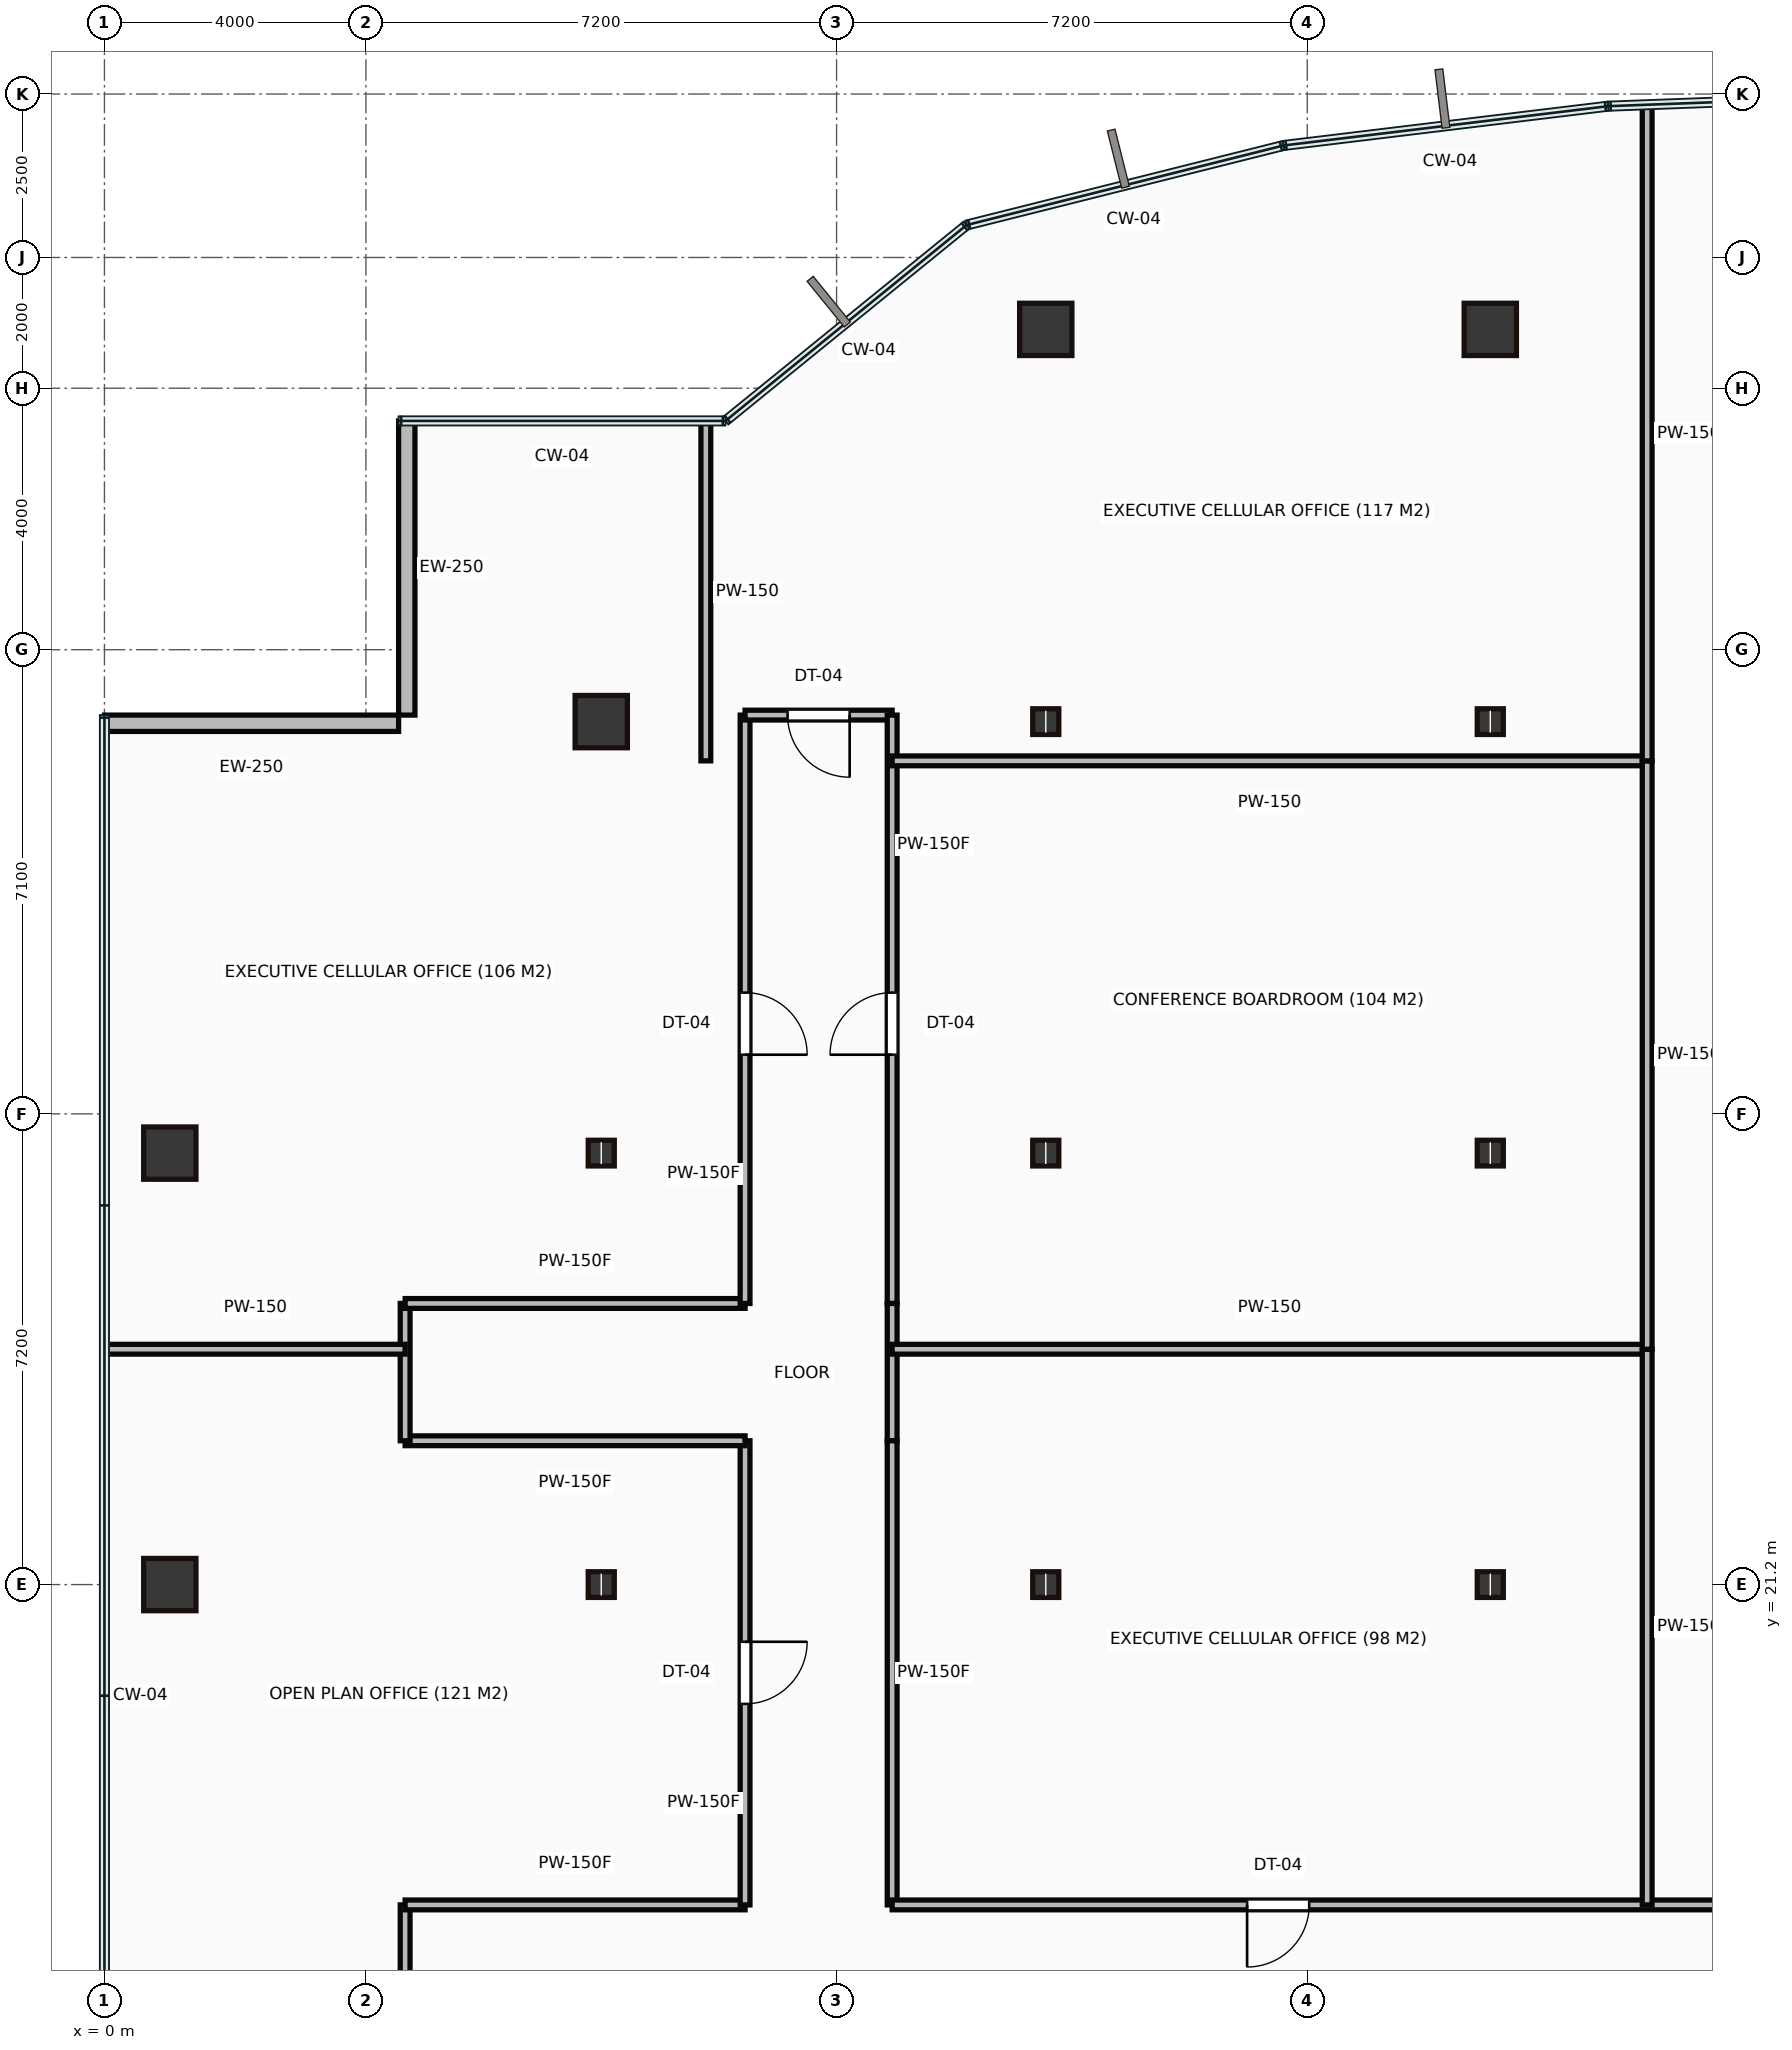
"""IFC4 building model, lengths in metres.
Left out: names, types, materials, properties, quantities, classifications, styles, units other than length and angle.
Written with IfcOpenShell. Run it as: python <this file> out.ifc"""

import sys

from ifc_helpers import new_model, si_unit, direction, frame, frame_2d, origin, origin_2d, place, context, subcontext, project, spatial, rectangle, hollow_rectangle, i_section, extrude, source, transform, mapped, element, fill, save


model = new_model("IFC4")
c1 = context("Model", 3, precision=1e-05, world=origin(), true_north=direction((0.0, 1.0)))
c2 = subcontext(c1, "Body", "Model", "MODEL_VIEW")
j1 = project(units=[si_unit("LENGTHUNIT", "METRE"), si_unit("PLANEANGLEUNIT", "RADIAN")], contexts=[c1])
p1 = place(None, origin())
s1 = spatial("IfcSite", under=j1, at=p1, CompositionType="ELEMENT")
p2 = place(p1, origin())
s2 = spatial("IfcBuilding", under=s1, at=p2, CompositionType="ELEMENT")
p3 = place(p2, frame((0.0, 0.0, 88.65)))
s3 = spatial("IfcBuildingStorey", under=s2, at=p3, CompositionType="ELEMENT", Elevation=88.65)
m1 = source(origin(), c2, "Body", "SweptSolid", [
    extrude(hollow_rectangle(XDim=0.8, YDim=0.8, WallThickness=0.04, at=origin_2d()), origin(), (0.0, 0.0, 1.0), 3.65),
])
for number, where, z_axis, x_axis in (
    (1, (1.0, 21.2, 0.0), (0.0, 0.0, 1.0), (1.0, 0.0, 0.0)),
    (2, (1.0, 27.8, 0.0), (0.0, 0.0, 1.0), (1.0, 0.0, 0.0)),
):
    element("IfcColumn", number, at=place(p3, frame(where, z_axis=z_axis, x_axis=x_axis)), inside=s3, PredefinedType="COLUMN", context=c2, shape_type="MappedRepresentation", body=[
        mapped(m1, transform((0.0, 0.0, 0.0))),
    ])
m2 = source(origin(), c2, "Body", "SweptSolid", [
    extrude(i_section(OverallWidth=0.399, OverallDepth=0.393, WebThickness=0.023, FlangeThickness=0.037, at=origin_2d()), origin(), (0.0, 0.0, 1.0), 3.65),
])
for number, where, z_axis, x_axis in (
    (3, (7.6, 21.2, 0.0), (0.0, 0.0, 1.0), (1.0, 0.0, 0.0)),
    (4, (7.6, 27.8, 0.0), (0.0, 0.0, 1.0), (1.0, 0.0, 0.0)),
):
    element("IfcColumn", number, at=place(p3, frame(where, z_axis=z_axis, x_axis=x_axis)), inside=s3, PredefinedType="COLUMN", context=c2, shape_type="MappedRepresentation", body=[
        mapped(m2, transform((0.0, 0.0, 0.0))),
    ])
p4 = place(p3, frame((7.6, 34.4, 0.0), z_axis=(0.0, 0.0, 1.0), x_axis=(1.0, 0.0, 0.0)))
e5 = element("IfcColumn", 5, at=p4, inside=s3, PredefinedType="COLUMN", context=c2, shape_type="MappedRepresentation", body=[
    mapped(m1, transform((0.0, 0.0, 0.0))),
])
for number, where, z_axis, x_axis in (
    (6, (14.4, 21.2, 0.0), (0.0, 0.0, 1.0), (1.0, 0.0, 0.0)),
    (7, (14.4, 27.8, 0.0), (0.0, 0.0, 1.0), (1.0, 0.0, 0.0)),
    (8, (14.4, 34.4, 0.0), (0.0, 0.0, 1.0), (1.0, 0.0, 0.0)),
):
    element("IfcColumn", number, at=place(p3, frame(where, z_axis=z_axis, x_axis=x_axis)), inside=s3, PredefinedType="COLUMN", context=c2, shape_type="MappedRepresentation", body=[
        mapped(m2, transform((0.0, 0.0, 0.0))),
    ])
p5 = place(p3, frame((14.4, 40.4, 0.0), z_axis=(0.0, 0.0, 1.0), x_axis=(1.0, 0.0, 0.0)))
e9 = element("IfcColumn", 9, at=p5, inside=s3, PredefinedType="COLUMN", context=c2, shape_type="MappedRepresentation", body=[
    mapped(m1, transform((0.0, 0.0, 0.0))),
])
for number, where, z_axis, x_axis in (
    (10, (21.2, 21.2, 0.0), (0.0, 0.0, 1.0), (1.0, 0.0, 0.0)),
    (11, (21.2, 27.8, 0.0), (0.0, 0.0, 1.0), (1.0, 0.0, 0.0)),
    (12, (21.2, 34.4, 0.0), (0.0, 0.0, 1.0), (1.0, 0.0, 0.0)),
):
    element("IfcColumn", number, at=place(p3, frame(where, z_axis=z_axis, x_axis=x_axis)), inside=s3, PredefinedType="COLUMN", context=c2, shape_type="MappedRepresentation", body=[
        mapped(m2, transform((0.0, 0.0, 0.0))),
    ])
p6 = place(p3, frame((21.2, 40.4, 0.0), z_axis=(0.0, 0.0, 1.0), x_axis=(1.0, 0.0, 0.0)))
e13 = element("IfcColumn", 13, at=p6, inside=s3, PredefinedType="COLUMN", context=c2, shape_type="MappedRepresentation", body=[
    mapped(m1, transform((0.0, 0.0, 0.0))),
])
m3 = source(origin(), c2, "Body", "SweptSolid", [
    extrude(rectangle(XDim=4.5, YDim=0.25, at=frame_2d((2.25, 0.0))), origin(), (0.0, 0.0, 1.0), 3.4),
])
for number, where, z_axis, x_axis in (
    (14, (4.625, 39.0, 0.0), (0.0, 0.0, 1.0), (0.0, -1.0, 0.0)),
    (15, (4.5, 34.375, 0.0), (0.0, 0.0, 1.0), (-1.0, 0.0, 0.0)),
):
    element("IfcWall", number, at=place(p3, frame(where, z_axis=z_axis, x_axis=x_axis)), inside=s3, PredefinedType="STANDARD", context=c2, shape_type="MappedRepresentation", body=[
        mapped(m3, transform((0.0, 0.0, 0.0))),
    ])
m4 = source(origin(), c2, "Body", "SweptSolid", [
    extrude(rectangle(XDim=2.22, YDim=0.15, at=frame_2d((1.11, 0.0))), origin(), (0.0, 0.0, 1.0), 3.4),
])
p7 = place(p3, frame((4.6, 14.08, 0.0), z_axis=(0.0, 0.0, 1.0), x_axis=(0.0, 1.0, 0.0)))
e16 = element("IfcWall", 16, at=p7, inside=s3, PredefinedType="PARTITIONING", context=c2, shape_type="MappedRepresentation", body=[
    mapped(m4, transform((0.0, 0.0, 0.0))),
])
m5 = source(origin(), c2, "Body", "SweptSolid", [
    extrude(rectangle(XDim=5.2, YDim=0.15, at=frame_2d((2.6, 0.0))), origin(), (0.0, 0.0, 1.0), 3.4),
])
p8 = place(p3, frame((4.6, 16.3, 0.0), z_axis=(0.0, 0.0, 1.0), x_axis=(1.0, 0.0, 0.0)))
e17 = element("IfcWall", 17, at=p8, inside=s3, PredefinedType="PARTITIONING", context=c2, shape_type="MappedRepresentation", body=[
    mapped(m5, transform((0.0, 0.0, 0.0))),
])
m6 = source(origin(), c2, "Body", "SweptSolid", [
    extrude(rectangle(XDim=7.1, YDim=0.15, at=frame_2d((3.55, 0.0))), origin(), (0.0, 0.0, 1.0), 3.4),
])
p9 = place(p3, frame((9.8, 16.3, 0.0), z_axis=(0.0, 0.0, 1.0), x_axis=(0.0, 1.0, 0.0)))
e18 = element("IfcWall", 18, at=p9, inside=s3, PredefinedType="PARTITIONING", context=c2, shape_type="MappedRepresentation", body=[
    mapped(m6, transform((0.0, 0.0, 0.0))),
])
p10 = place(p9, frame((3.075, 0.0, 0.0)))
e19 = element("IfcOpeningElement", 19, at=p10, cuts=e18, PredefinedType="OPENING", context=c2, shape_type="SweptSolid", body=[
    extrude(rectangle(XDim=0.95, YDim=2.15, at=frame_2d((0.475, 1.075))), frame((0.0, 0.085, 0.0), z_axis=(0.0, -1.0, 0.0), x_axis=(1.0, 0.0, 0.0)), (0.0, 0.0, 1.0), 0.17),
])
m7 = source(origin(), c2, "Body", "SweptSolid", [
    extrude(rectangle(XDim=5.2, YDim=0.15, at=frame_2d((2.6, 0.0))), origin(), (0.0, 0.0, 1.0), 2.988),
])
p11 = place(p3, frame((9.8, 23.4, 0.0), z_axis=(0.0, 0.0, 1.0), x_axis=(-1.0, 0.0, 0.0)))
e20 = element("IfcWall", 20, at=p11, inside=s3, PredefinedType="PARTITIONING", context=c2, shape_type="MappedRepresentation", body=[
    mapped(m7, transform((0.0, 0.0, 0.0))),
])
m8 = source(origin(), c2, "Body", "SweptSolid", [
    extrude(rectangle(XDim=2.1, YDim=0.15, at=frame_2d((1.05, 0.0))), origin(), (0.0, 0.0, 1.0), 3.4),
])
p12 = place(p3, frame((4.6, 23.4, 0.0), z_axis=(0.0, 0.0, 1.0), x_axis=(0.0, 1.0, 0.0)))
e21 = element("IfcWall", 21, at=p12, inside=s3, PredefinedType="PARTITIONING", context=c2, shape_type="MappedRepresentation", body=[
    mapped(m8, transform((0.0, 0.0, 0.0))),
])
p13 = place(p3, frame((4.6, 25.5, 0.0), z_axis=(0.0, 0.0, 1.0), x_axis=(1.0, 0.0, 0.0)))
e22 = element("IfcWall", 22, at=p13, inside=s3, PredefinedType="PARTITIONING", context=c2, shape_type="MappedRepresentation", body=[
    mapped(m7, transform((0.0, 0.0, 0.0))),
])
m9 = source(origin(), c2, "Body", "SweptSolid", [
    extrude(rectangle(XDim=9.0, YDim=0.15, at=frame_2d((4.5, 0.0))), origin(), (0.0, 0.0, 1.0), 3.4),
])
p14 = place(p3, frame((9.8, 25.5, 0.0), z_axis=(0.0, 0.0, 1.0), x_axis=(0.0, 1.0, 0.0)))
e23 = element("IfcWall", 23, at=p14, inside=s3, PredefinedType="PARTITIONING", context=c2, shape_type="MappedRepresentation", body=[
    mapped(m9, transform((0.0, 0.0, 0.0))),
])
p15 = place(p14, frame((3.805, 0.0, 0.0)))
e24 = element("IfcOpeningElement", 24, at=p15, cuts=e23, PredefinedType="OPENING", context=c2, shape_type="SweptSolid", body=[
    extrude(rectangle(XDim=0.95, YDim=2.15, at=frame_2d((0.475, 1.075))), frame((0.0, 0.085, 0.0), z_axis=(0.0, -1.0, 0.0), x_axis=(1.0, 0.0, 0.0)), (0.0, 0.0, 1.0), 0.17),
])
m10 = source(origin(), c2, "Body", "SweptSolid", [
    extrude(rectangle(XDim=2.25, YDim=0.15, at=frame_2d((1.125, 0.0))), origin(), (0.0, 0.0, 1.0), 2.702),
])
p16 = place(p3, frame((9.8, 34.5, 0.0), z_axis=(0.0, 0.0, 1.0), x_axis=(1.0, 0.0, 0.0)))
e25 = element("IfcWall", 25, at=p16, inside=s3, PredefinedType="PARTITIONING", context=c2, shape_type="MappedRepresentation", body=[
    mapped(m10, transform((0.0, 0.0, 0.0))),
])
p17 = place(p16, frame((0.65, 0.0, 0.0)))
e26 = element("IfcOpeningElement", 26, at=p17, cuts=e25, PredefinedType="OPENING", context=c2, shape_type="SweptSolid", body=[
    extrude(rectangle(XDim=0.95, YDim=2.15, at=frame_2d((0.475, 1.075))), frame((0.0, 0.085, 0.0), z_axis=(0.0, -1.0, 0.0), x_axis=(1.0, 0.0, 0.0)), (0.0, 0.0, 1.0), 0.17),
])
p18 = place(p3, frame((12.05, 34.5, 0.0), z_axis=(0.0, 0.0, 1.0), x_axis=(0.0, -1.0, 0.0)))
e27 = element("IfcWall", 27, at=p18, inside=s3, PredefinedType="PARTITIONING", context=c2, shape_type="MappedRepresentation", body=[
    mapped(m9, transform((0.0, 0.0, 0.0))),
])
p19 = place(p18, frame((4.245, 0.0, 0.0)))
e28 = element("IfcOpeningElement", 28, at=p19, cuts=e27, PredefinedType="OPENING", context=c2, shape_type="SweptSolid", body=[
    extrude(rectangle(XDim=0.95, YDim=2.15, at=frame_2d((0.475, 1.075))), frame((0.0, 0.085, 0.0), z_axis=(0.0, -1.0, 0.0), x_axis=(1.0, 0.0, 0.0)), (0.0, 0.0, 1.0), 0.17),
])
p20 = place(p3, frame((12.05, 25.5, 0.0), z_axis=(0.0, 0.0, 1.0), x_axis=(0.0, -1.0, 0.0)))
e29 = element("IfcWall", 29, at=p20, inside=s3, PredefinedType="PARTITIONING", context=c2, shape_type="MappedRepresentation", body=[
    mapped(m8, transform((0.0, 0.0, 0.0))),
])
p21 = place(p3, frame((12.05, 23.4, 0.0), z_axis=(0.0, 0.0, 1.0), x_axis=(0.0, -1.0, 0.0)))
e30 = element("IfcWall", 30, at=p21, inside=s3, PredefinedType="PARTITIONING", context=c2, shape_type="MappedRepresentation", body=[
    mapped(m6, transform((0.0, 0.0, 0.0))),
])
m11 = source(origin(), c2, "Body", "SweptSolid", [
    extrude(rectangle(XDim=28.75, YDim=0.15, at=frame_2d((14.375, 0.0))), origin(), (0.0, 0.0, 1.0), 3.4),
])
p22 = place(p3, frame((12.05, 16.3, 0.0), z_axis=(0.0, 0.0, 1.0), x_axis=(1.0, 0.0, 0.0)))
e31 = element("IfcWall", 31, at=p22, inside=s3, PredefinedType="PARTITIONING", context=c2, shape_type="MappedRepresentation", body=[
    mapped(m11, transform((0.0, 0.0, 0.0))),
])
p23 = place(p22, frame((5.43, 0.0, 0.0)))
e32 = element("IfcOpeningElement", 32, at=p23, cuts=e31, PredefinedType="OPENING", context=c2, shape_type="SweptSolid", body=[
    extrude(rectangle(XDim=0.95, YDim=2.15, at=frame_2d((0.475, 1.075))), frame((0.0, 0.085, 0.0), z_axis=(0.0, -1.0, 0.0), x_axis=(1.0, 0.0, 0.0)), (0.0, 0.0, 1.0), 0.17),
])
p24 = place(p22, frame((16.675, 0.0, 0.0)))
e33 = element("IfcOpeningElement", 33, at=p24, cuts=e31, PredefinedType="OPENING", context=c2, shape_type="SweptSolid", body=[
    extrude(rectangle(XDim=0.95, YDim=2.15, at=frame_2d((0.475, 1.075))), frame((0.0, 0.085, 0.0), z_axis=(0.0, -1.0, 0.0), x_axis=(1.0, 0.0, 0.0)), (0.0, 0.0, 1.0), 0.17),
])
p25 = place(p22, frame((25.145, 0.0, 0.0)))
e34 = element("IfcOpeningElement", 34, at=p25, cuts=e31, PredefinedType="OPENING", context=c2, shape_type="SweptSolid", body=[
    extrude(rectangle(XDim=0.95, YDim=2.15, at=frame_2d((0.475, 1.075))), frame((0.0, 0.085, 0.0), z_axis=(0.0, -1.0, 0.0), x_axis=(1.0, 0.0, 0.0)), (0.0, 0.0, 1.0), 0.17),
])
m12 = source(origin(), c2, "Body", "SweptSolid", [
    extrude(rectangle(XDim=4.58, YDim=0.15, at=frame_2d((2.29, 0.0))), origin(), (0.0, 0.0, 1.0), 3.4),
])
p26 = place(p3, frame((0.02, 24.8, 0.0), z_axis=(0.0, 0.0, 1.0), x_axis=(1.0, 0.0, 0.0)))
e35 = element("IfcWall", 35, at=p26, inside=s3, PredefinedType="PARTITIONING", context=c2, shape_type="MappedRepresentation", body=[
    mapped(m12, transform((0.0, 0.0, 0.0))),
])
m13 = source(origin(), c2, "Body", "SweptSolid", [
    extrude(rectangle(XDim=5.18, YDim=0.15, at=frame_2d((2.59, 0.0))), origin(), (0.0, 0.0, 1.0), 3.4),
])
p27 = place(p3, frame((9.2, 38.98, 0.0), z_axis=(0.0, 0.0, 1.0), x_axis=(0.0, -1.0, 0.0)))
e36 = element("IfcWall", 36, at=p27, inside=s3, PredefinedType="PARTITIONING", context=c2, shape_type="MappedRepresentation", body=[
    mapped(m13, transform((0.0, 0.0, 0.0))),
])
m14 = source(origin(), c2, "Body", "SweptSolid", [
    extrude(rectangle(XDim=11.55, YDim=0.15, at=frame_2d((5.775, 0.0))), origin(), (0.0, 0.0, 1.0), 3.4),
])
for number, where, z_axis, x_axis in (
    (37, (12.05, 24.8, 0.0), (0.0, 0.0, 1.0), (1.0, 0.0, 0.0)),
    (38, (23.6, 33.8, 0.0), (0.0, 0.0, 1.0), (-1.0, 0.0, 0.0)),
):
    element("IfcWall", number, at=place(p3, frame(where, z_axis=z_axis, x_axis=x_axis)), inside=s3, PredefinedType="PARTITIONING", context=c2, shape_type="MappedRepresentation", body=[
        mapped(m14, transform((0.0, 0.0, 0.0))),
    ])
m15 = source(origin(), c2, "Body", "SweptSolid", [
    extrude(rectangle(XDim=8.5, YDim=0.15, at=frame_2d((4.25, 0.0))), origin(), (0.0, 0.0, 1.0), 3.4),
])
p28 = place(p3, frame((23.6, 24.8, 0.0), z_axis=(0.0, 0.0, 1.0), x_axis=(0.0, -1.0, 0.0)))
e39 = element("IfcWall", 39, at=p28, inside=s3, PredefinedType="PARTITIONING", context=c2, shape_type="MappedRepresentation", body=[
    mapped(m15, transform((0.0, 0.0, 0.0))),
])
p29 = place(p3, frame((23.6, 33.8, 0.0), z_axis=(0.0, 0.0, 1.0), x_axis=(0.0, -1.0, 0.0)))
e40 = element("IfcWall", 40, at=p29, inside=s3, PredefinedType="PARTITIONING", context=c2, shape_type="MappedRepresentation", body=[
    mapped(m9, transform((0.0, 0.0, 0.0))),
])
m16 = source(origin(), c2, "Body", "SweptSolid", [
    extrude(rectangle(XDim=10.016, YDim=0.15, at=frame_2d((5.008, 0.0))), origin(), (0.0, 0.0, 1.0), 3.4),
])
p30 = place(p3, frame((23.6, 43.816, 0.0), z_axis=(0.0, 0.0, 1.0), x_axis=(0.0, -1.0, 0.0)))
e41 = element("IfcWall", 41, at=p30, inside=s3, PredefinedType="PARTITIONING", context=c2, shape_type="MappedRepresentation", body=[
    mapped(m16, transform((0.0, 0.0, 0.0))),
])
m17 = source(origin(), c2, "Body", "SweptSolid", [
    extrude(rectangle(XDim=0.95, YDim=2.15, at=frame_2d((0.475, 1.075))), frame((0.0, 0.025, 0.0), z_axis=(0.0, -1.0, 0.0), x_axis=(1.0, 0.0, 0.0)), (0.0, 0.0, 1.0), 0.05),
])
p31 = place(p10, origin())
e42 = element("IfcDoor", 42, at=p31, inside=s3, OperationType="SINGLE_SWING_RIGHT", PredefinedType="DOOR", context=c2, shape_type="MappedRepresentation", body=[
    mapped(m17, transform((0.0, 0.0, 0.0))),
])
fill(e19, e42)
p32 = place(p15, origin())
e43 = element("IfcDoor", 43, at=p32, inside=s3, OperationType="SINGLE_SWING_LEFT", PredefinedType="DOOR", context=c2, shape_type="MappedRepresentation", body=[
    mapped(m17, transform((0.0, 0.0, 0.0))),
])
fill(e24, e43)
p33 = place(p17, origin())
e44 = element("IfcDoor", 44, at=p33, inside=s3, OperationType="SINGLE_SWING_RIGHT", PredefinedType="DOOR", context=c2, shape_type="MappedRepresentation", body=[
    mapped(m17, transform((0.0, 0.0, 0.0))),
])
fill(e26, e44)
p34 = place(p23, origin())
e45 = element("IfcDoor", 45, at=p34, inside=s3, OperationType="SINGLE_SWING_LEFT", PredefinedType="DOOR", context=c2, shape_type="MappedRepresentation", body=[
    mapped(m17, transform((0.0, 0.0, 0.0))),
])
fill(e32, e45)
p35 = place(p19, origin())
e46 = element("IfcDoor", 46, at=p35, inside=s3, OperationType="SINGLE_SWING_RIGHT", PredefinedType="DOOR", context=c2, shape_type="MappedRepresentation", body=[
    mapped(m17, transform((0.0, 0.0, 0.0))),
])
fill(e28, e46)
save(model, sys.argv[1])
